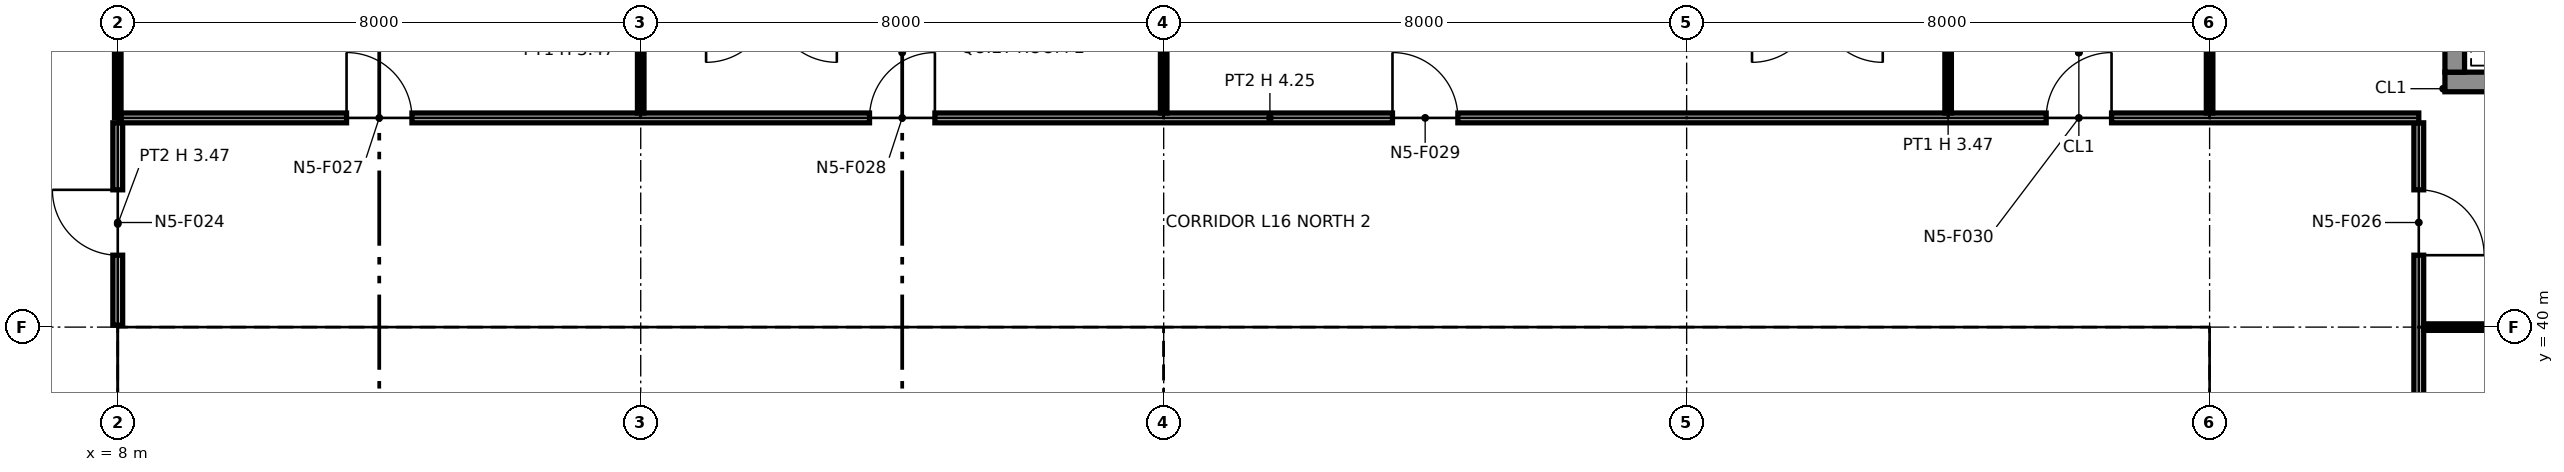
"""IFC4 building model, lengths in metres.
Left out: names, types, materials, properties, quantities, classifications, styles, units other than length and angle.
Written with IfcOpenShell. Run it as: python <this file> out.ifc"""

import sys

from ifc_helpers import new_model, si_unit, direction, frame, frame_2d, origin, origin_2d, place, context, subcontext, project, spatial, polyline, rectangle, i_section, outline, extrude, element, fill, save


model = new_model("IFC4")
c1 = context("Model", 3, precision=1e-05, world=origin(), true_north=direction((0.0, 1.0)))
c2 = subcontext(c1, "Body", "Model", "MODEL_VIEW")
j1 = project(units=[si_unit("LENGTHUNIT", "METRE"), si_unit("PLANEANGLEUNIT", "RADIAN")], contexts=[c1])
p1 = place(None, origin())
s1 = spatial("IfcSite", under=j1, at=p1, CompositionType="ELEMENT")
p2 = place(p1, origin())
s2 = spatial("IfcBuilding", under=s1, at=p2, CompositionType="ELEMENT")
p3 = place(p2, frame((0.0, 0.0, 87.6)))
s3 = spatial("IfcBuildingStorey", under=s2, at=p3, CompositionType="ELEMENT", Elevation=87.6)
for number, where, z_axis, x_axis in (
    (1, (8.0, 40.0, 0.0), (0.0, 0.0, 1.0), (1.0, 0.0, 0.0)),
    (2, (16.0, 40.0, 0.0), (0.0, 0.0, 1.0), (1.0, 0.0, 0.0)),
):
    element("IfcColumn", number, at=place(p3, frame(where, z_axis=z_axis, x_axis=x_axis)), inside=s3, PredefinedType="COLUMN", context=c2, shape_type="SweptSolid", body=[
        extrude(i_section(OverallWidth=0.394, OverallDepth=0.376, WebThickness=0.017, FlangeThickness=0.028, at=origin_2d()), origin(), (0.0, 0.0, 1.0), 4.25),
    ])
p4 = place(p3, frame((24.0, 40.0, 0.0), z_axis=(0.0, 0.0, 1.0), x_axis=(1.0, 0.0, 0.0)))
e3 = element("IfcColumn", 3, at=p4, inside=s3, PredefinedType="COLUMN", context=c2, shape_type="SweptSolid", body=[
    extrude(i_section(OverallWidth=0.399, OverallDepth=0.386, WebThickness=0.021, FlangeThickness=0.033, at=origin_2d()), origin(), (0.0, 0.0, 1.0), 4.25),
])
for number, where, z_axis, x_axis in (
    (4, (32.0, 40.0, 0.0), (0.0, 0.0, 1.0), (1.0, 0.0, 0.0)),
    (5, (40.0, 40.0, 0.0), (0.0, 0.0, 1.0), (1.0, 0.0, 0.0)),
):
    element("IfcColumn", number, at=place(p3, frame(where, z_axis=z_axis, x_axis=x_axis)), inside=s3, PredefinedType="COLUMN", context=c2, shape_type="SweptSolid", body=[
        extrude(i_section(OverallWidth=0.257, OverallDepth=0.363, WebThickness=0.013, FlangeThickness=0.022, at=origin_2d()), origin(), (0.0, 0.0, 1.0), 4.25),
    ])
p5 = place(p3, frame((45.9, 43.75, 0.0), z_axis=(0.0, 0.0, 1.0), x_axis=(-1.0, 0.0, 0.0)))
e6 = element("IfcWall", 6, at=p5, inside=s3, PredefinedType="SOLIDWALL", context=c2, shape_type="SweptSolid", body=[
    extrude(rectangle(XDim=2.3, YDim=0.3, at=frame_2d((1.15, 0.0))), origin(), (0.0, 0.0, 1.0), 4.25),
])
p6 = place(p3, frame((43.75, 43.9, 0.0), z_axis=(0.0, 0.0, 1.0), x_axis=(0.0, 1.0, 0.0)))
e7 = element("IfcWall", 7, at=p6, inside=s3, PredefinedType="SOLIDWALL", context=c2, shape_type="SweptSolid", body=[
    extrude(rectangle(XDim=1.7, YDim=0.3, at=frame_2d((0.85, 0.0))), origin(), (0.0, 0.0, 1.0), 4.25),
])
p7 = place(p3, frame((8.75, 32.85, 0.0), z_axis=(0.0, 0.0, 1.0), x_axis=(0.0, 1.0, 0.0)))
e8 = element("IfcWall", 8, at=p7, inside=s3, PredefinedType="PARTITIONING", context=c2, shape_type="SweptSolid", body=[
    extrude(outline(polyline([(0.0, 0.0), (6.3, 0.0), (6.3, 4.25), (3.231, 4.25), (3.23, 3.789), (3.07, 3.789), (3.069, 4.25), (0.0, 4.25), (0.0, 0.0)])), frame((0.0, 0.1, 0.0), z_axis=(0.0, -1.0, 0.0), x_axis=(1.0, 0.0, 0.0)), (0.0, 0.0, 1.0), 0.2),
])
p8 = place(p3, frame((8.65, 39.25, 0.0), z_axis=(0.0, 0.0, 1.0), x_axis=(1.0, 0.0, 0.0)))
e9 = element("IfcWall", 9, at=p8, inside=s3, PredefinedType="PARTITIONING", context=c2, shape_type="SweptSolid", body=[
    extrude(outline(polyline([(0.0, 0.0), (14.7, 0.0), (14.7, 4.25), (7.469, 4.25), (7.469, 3.632), (7.231, 3.632), (7.23, 4.25), (0.0, 4.25), (0.0, 0.0)])), frame((0.0, 0.1, 0.0), z_axis=(0.0, -1.0, 0.0), x_axis=(1.0, 0.0, 0.0)), (0.0, 0.0, 1.0), 0.2),
])
for number, where, z_axis, x_axis in (
    (10, (11.075, 36.15, 0.0), (0.0, 0.0, 1.0), (0.0, 1.0, 0.0)),
    (11, (13.225, 36.15, 0.0), (0.0, 0.0, 1.0), (0.0, 1.0, 0.0)),
):
    element("IfcWall", number, at=place(p3, frame(where, z_axis=z_axis, x_axis=x_axis)), inside=s3, PredefinedType="PARTITIONING", context=c2, shape_type="SweptSolid", body=[
        extrude(rectangle(XDim=3.0, YDim=0.15, at=frame_2d((1.5, 0.0))), origin(), (0.0, 0.0, 1.0), 4.25),
    ])
p9 = place(p3, frame((16.0, 36.15, 0.0), z_axis=(0.0, 0.0, 1.0), x_axis=(0.0, 1.0, 0.0)))
e12 = element("IfcWall", 12, at=p9, inside=s3, PredefinedType="PARTITIONING", context=c2, shape_type="SweptSolid", body=[
    extrude(rectangle(XDim=3.0, YDim=0.6, at=frame_2d((1.5, 0.0))), origin(), (0.0, 0.0, 1.0), 3.632),
])
for number, where, z_axis, x_axis in (
    (13, (19.2, 32.85, 0.0), (0.0, 0.0, 1.0), (0.0, 1.0, 0.0)),
    (14, (23.25, 32.85, 0.0), (0.0, 0.0, 1.0), (0.0, 1.0, 0.0)),
):
    element("IfcWall", number, at=place(p3, frame(where, z_axis=z_axis, x_axis=x_axis)), inside=s3, PredefinedType="PARTITIONING", context=c2, shape_type="SweptSolid", body=[
        extrude(rectangle(XDim=6.3, YDim=0.2, at=frame_2d((3.15, 0.0))), origin(), (0.0, 0.0, 1.0), 4.25),
    ])
p10 = place(p3, frame((24.75, 32.85, 0.0), z_axis=(0.0, 0.0, 1.0), x_axis=(0.0, 1.0, 0.0)))
e15 = element("IfcWall", 15, at=p10, inside=s3, PredefinedType="PARTITIONING", context=c2, shape_type="SweptSolid", body=[
    extrude(outline(polyline([(0.0, 0.0), (6.3, 0.0), (6.3, 4.25), (3.231, 4.25), (3.23, 3.789), (3.07, 3.789), (3.069, 4.25), (0.0, 4.25), (0.0, 0.0)])), frame((0.0, 0.1, 0.0), z_axis=(0.0, -1.0, 0.0), x_axis=(1.0, 0.0, 0.0)), (0.0, 0.0, 1.0), 0.2),
])
p11 = place(p3, frame((24.65, 39.25, 0.0), z_axis=(0.0, 0.0, 1.0), x_axis=(1.0, 0.0, 0.0)))
e16 = element("IfcWall", 16, at=p11, inside=s3, PredefinedType="PARTITIONING", context=c2, shape_type="SweptSolid", body=[
    extrude(outline(polyline([(0.0, 0.0), (14.7, 0.0), (14.7, 4.25), (7.469, 4.25), (7.469, 3.632), (7.231, 3.632), (7.23, 4.25), (0.0, 4.25), (0.0, 0.0)])), frame((0.0, 0.1, 0.0), z_axis=(0.0, -1.0, 0.0), x_axis=(1.0, 0.0, 0.0)), (0.0, 0.0, 1.0), 0.2),
])
for number, where, z_axis, x_axis in (
    (17, (27.2, 36.6, 0.0), (0.0, 0.0, 1.0), (0.0, 1.0, 0.0)),
    (18, (29.5, 36.6, 0.0), (0.0, 0.0, 1.0), (0.0, 1.0, 0.0)),
):
    element("IfcWall", number, at=place(p3, frame(where, z_axis=z_axis, x_axis=x_axis)), inside=s3, PredefinedType="PARTITIONING", context=c2, shape_type="SweptSolid", body=[
        extrude(rectangle(XDim=2.55, YDim=0.2, at=frame_2d((1.275, 0.0))), origin(), (0.0, 0.0, 1.0), 4.25),
    ])
p12 = place(p3, frame((32.0, 36.6, 0.0), z_axis=(0.0, 0.0, 1.0), x_axis=(0.0, 1.0, 0.0)))
e19 = element("IfcWall", 19, at=p12, inside=s3, PredefinedType="PARTITIONING", context=c2, shape_type="SweptSolid", body=[
    extrude(rectangle(XDim=2.55, YDim=0.6, at=frame_2d((1.275, 0.0))), origin(), (0.0, 0.0, 1.0), 3.632),
])
for number, where, z_axis, x_axis in (
    (20, (35.6, 32.85, 0.0), (0.0, 0.0, 1.0), (0.0, 1.0, 0.0)),
    (21, (39.25, 32.85, 0.0), (0.0, 0.0, 1.0), (0.0, 1.0, 0.0)),
):
    element("IfcWall", number, at=place(p3, frame(where, z_axis=z_axis, x_axis=x_axis)), inside=s3, PredefinedType="PARTITIONING", context=c2, shape_type="SweptSolid", body=[
        extrude(rectangle(XDim=6.3, YDim=0.2, at=frame_2d((3.15, 0.0))), origin(), (0.0, 0.0, 1.0), 4.25),
    ])
p13 = place(p3, frame((43.2, 16.0, 0.0), z_axis=(0.0, 0.0, 1.0), x_axis=(0.0, 1.0, 0.0)))
e22 = element("IfcWall", 22, at=p13, inside=s3, PredefinedType="PARTITIONING", context=c2, shape_type="SweptSolid", body=[
    extrude(outline(polyline([(0.0, 0.0), (27.125, 0.0), (27.125, 4.25), (24.3, 4.25), (24.298, 3.47), (23.702, 3.47), (23.7, 4.25), (20.3, 4.25), (20.298, 3.47), (19.702, 3.47), (19.7, 4.25), (16.3, 4.25), (16.298, 3.47), (15.702, 3.47), (15.7, 4.25), (12.3, 4.25), (12.298, 3.47), (11.702, 3.47), (11.7, 4.25), (8.3, 4.25), (8.298, 3.47), (7.702, 3.47), (7.7, 4.25), (4.3, 4.25), (4.298, 3.47), (3.702, 3.47), (3.7, 4.25), (0.0, 4.25), (0.0, 0.0)])), frame((0.0, 0.075, 0.0), z_axis=(0.0, -1.0, 0.0), x_axis=(1.0, 0.0, 0.0)), (0.0, 0.0, 1.0), 0.15),
])
p14 = place(p13, frame((2.5, 0.0, 0.0), z_axis=(0.0, 0.0, 1.0), x_axis=(-1.0, 0.0, 0.0)))
e23 = element("IfcOpeningElement", 23, at=p14, cuts=e22, PredefinedType="OPENING", context=c2, shape_type="SweptSolid", body=[
    extrude(rectangle(XDim=1.0, YDim=2.1, at=frame_2d((0.5, 1.05))), frame((0.0, 0.085, 0.0), z_axis=(0.0, -1.0, 0.0), x_axis=(1.0, 0.0, 0.0)), (0.0, 0.0, 1.0), 0.17),
])
p15 = place(p13, frame((12.5, 0.0, 0.0), z_axis=(0.0, 0.0, 1.0), x_axis=(-1.0, 0.0, 0.0)))
e24 = element("IfcOpeningElement", 24, at=p15, cuts=e22, PredefinedType="OPENING", context=c2, shape_type="SweptSolid", body=[
    extrude(rectangle(XDim=1.0, YDim=2.1, at=frame_2d((0.5, 1.05))), frame((0.0, 0.085, 0.0), z_axis=(0.0, -1.0, 0.0), x_axis=(1.0, 0.0, 0.0)), (0.0, 0.0, 1.0), 0.17),
])
p16 = place(p13, frame((18.5, 0.0, 0.0), z_axis=(0.0, 0.0, 1.0), x_axis=(-1.0, 0.0, 0.0)))
e25 = element("IfcOpeningElement", 25, at=p16, cuts=e22, PredefinedType="OPENING", context=c2, shape_type="SweptSolid", body=[
    extrude(rectangle(XDim=1.0, YDim=2.1, at=frame_2d((0.5, 1.05))), frame((0.0, 0.085, 0.0), z_axis=(0.0, -1.0, 0.0), x_axis=(1.0, 0.0, 0.0)), (0.0, 0.0, 1.0), 0.17),
])
p17 = place(p13, frame((22.5, 0.0, 0.0), z_axis=(0.0, 0.0, 1.0), x_axis=(-1.0, 0.0, 0.0)))
e26 = element("IfcOpeningElement", 26, at=p17, cuts=e22, PredefinedType="OPENING", context=c2, shape_type="SweptSolid", body=[
    extrude(rectangle(XDim=1.0, YDim=2.1, at=frame_2d((0.5, 1.05))), frame((0.0, 0.085, 0.0), z_axis=(0.0, -1.0, 0.0), x_axis=(1.0, 0.0, 0.0)), (0.0, 0.0, 1.0), 0.17),
])
p18 = place(p13, frame((26.1, 0.0, 0.0), z_axis=(0.0, 0.0, 1.0), x_axis=(-1.0, 0.0, 0.0)))
e27 = element("IfcOpeningElement", 27, at=p18, cuts=e22, PredefinedType="OPENING", context=c2, shape_type="SweptSolid", body=[
    extrude(rectangle(XDim=1.0, YDim=2.1, at=frame_2d((0.5, 1.05))), frame((0.0, 0.085, 0.0), z_axis=(0.0, -1.0, 0.0), x_axis=(1.0, 0.0, 0.0)), (0.0, 0.0, 1.0), 0.17),
])
p19 = place(p3, frame((43.275, 40.0, 0.0), z_axis=(0.0, 0.0, 1.0), x_axis=(1.0, 0.0, 0.0)))
e28 = element("IfcWall", 28, at=p19, inside=s3, PredefinedType="PARTITIONING", context=c2, shape_type="SweptSolid", body=[
    extrude(rectangle(XDim=4.595, YDim=0.1, at=frame_2d((2.298, 0.0))), origin(), (0.0, 0.0, 1.0), 3.47),
])
p20 = place(p3, frame((8.0, 40.03, 0.0), z_axis=(0.0, 0.0, 1.0), x_axis=(0.0, 1.0, 0.0)))
e29 = element("IfcWall", 29, at=p20, inside=s3, PredefinedType="PARTITIONING", context=c2, shape_type="SweptSolid", body=[
    extrude(rectangle(XDim=3.095, YDim=0.15, at=frame_2d((1.547, 0.0))), origin(), (0.0, 0.0, 1.0), 3.47),
])
p21 = place(p20, frame((1.07, 0.0, 0.0)))
e30 = element("IfcOpeningElement", 30, at=p21, cuts=e29, PredefinedType="OPENING", context=c2, shape_type="SweptSolid", body=[
    extrude(rectangle(XDim=1.0, YDim=2.1, at=frame_2d((0.5, 1.05))), frame((0.0, 0.085, 0.0), z_axis=(0.0, -1.0, 0.0), x_axis=(1.0, 0.0, 0.0)), (0.0, 0.0, 1.0), 0.17),
])
p22 = place(p3, frame((8.05, 43.2, 0.0), z_axis=(0.0, 0.0, 1.0), x_axis=(1.0, 0.0, 0.0)))
e31 = element("IfcWall", 31, at=p22, inside=s3, PredefinedType="PARTITIONING", context=c2, shape_type="SweptSolid", body=[
    extrude(rectangle(XDim=35.15, YDim=0.15, at=frame_2d((17.575, 0.0))), origin(), (0.0, 0.0, 1.0), 4.25),
])
p23 = place(p22, frame((3.45, 0.0, 0.0)))
e32 = element("IfcOpeningElement", 32, at=p23, cuts=e31, PredefinedType="OPENING", context=c2, shape_type="SweptSolid", body=[
    extrude(rectangle(XDim=1.0, YDim=2.1, at=frame_2d((0.5, 1.05))), frame((0.0, 0.085, 0.0), z_axis=(0.0, -1.0, 0.0), x_axis=(1.0, 0.0, 0.0)), (0.0, 0.0, 1.0), 0.17),
])
p24 = place(p22, frame((11.45, 0.0, 0.0)))
e33 = element("IfcOpeningElement", 33, at=p24, cuts=e31, PredefinedType="OPENING", context=c2, shape_type="SweptSolid", body=[
    extrude(rectangle(XDim=1.0, YDim=2.1, at=frame_2d((0.5, 1.05))), frame((0.0, 0.085, 0.0), z_axis=(0.0, -1.0, 0.0), x_axis=(1.0, 0.0, 0.0)), (0.0, 0.0, 1.0), 0.17),
])
p25 = place(p22, frame((19.45, 0.0, 0.0)))
e34 = element("IfcOpeningElement", 34, at=p25, cuts=e31, PredefinedType="OPENING", context=c2, shape_type="SweptSolid", body=[
    extrude(rectangle(XDim=1.0, YDim=2.1, at=frame_2d((0.5, 1.05))), frame((0.0, 0.085, 0.0), z_axis=(0.0, -1.0, 0.0), x_axis=(1.0, 0.0, 0.0)), (0.0, 0.0, 1.0), 0.17),
])
p26 = place(p22, frame((29.45, 0.0, 0.0)))
e35 = element("IfcOpeningElement", 35, at=p26, cuts=e31, PredefinedType="OPENING", context=c2, shape_type="SweptSolid", body=[
    extrude(rectangle(XDim=1.0, YDim=2.1, at=frame_2d((0.5, 1.05))), frame((0.0, 0.085, 0.0), z_axis=(0.0, -1.0, 0.0), x_axis=(1.0, 0.0, 0.0)), (0.0, 0.0, 1.0), 0.17),
])
p27 = place(p3, frame((8.0, 43.2, 0.0), z_axis=(0.0, 0.0, 1.0), x_axis=(0.0, 1.0, 0.0)))
e36 = element("IfcWall", 36, at=p27, inside=s3, PredefinedType="PARTITIONING", context=c2, shape_type="SweptSolid", body=[
    extrude(rectangle(XDim=4.67, YDim=0.1, at=frame_2d((2.335, 0.0))), origin(), (0.0, 0.0, 1.0), 3.47),
])
for number, where, z_axis, x_axis in (
    (37, (16.0, 43.275, 0.0), (0.0, 0.0, 1.0), (0.0, 1.0, 0.0)),
    (38, (24.0, 43.275, 0.0), (0.0, 0.0, 1.0), (0.0, 1.0, 0.0)),
    (39, (36.0, 43.275, 0.0), (0.0, 0.0, 1.0), (0.0, 1.0, 0.0)),
    (40, (40.0, 43.275, 0.0), (0.0, 0.0, 1.0), (0.0, 1.0, 0.0)),
):
    element("IfcWall", number, at=place(p3, frame(where, z_axis=z_axis, x_axis=x_axis)), inside=s3, PredefinedType="PARTITIONING", context=c2, shape_type="SweptSolid", body=[
        extrude(rectangle(XDim=1.895, YDim=0.1, at=frame_2d((0.948, 0.0))), origin(), (0.0, 0.0, 1.0), 3.47),
    ])
p28 = place(p21, origin())
e41 = element("IfcDoor", 41, at=p28, inside=s3, OperationType="SINGLE_SWING_RIGHT", PredefinedType="DOOR", context=c2, shape_type="SweptSolid", body=[
    extrude(rectangle(XDim=1.0, YDim=2.1, at=frame_2d((0.5, 1.05))), frame((0.0, 0.025, 0.0), z_axis=(0.0, -1.0, 0.0), x_axis=(1.0, 0.0, 0.0)), (0.0, 0.0, 1.0), 0.05),
])
fill(e30, e41)
p29 = place(p18, origin())
e42 = element("IfcDoor", 42, at=p29, inside=s3, OperationType="SINGLE_SWING_RIGHT", PredefinedType="DOOR", context=c2, shape_type="SweptSolid", body=[
    extrude(rectangle(XDim=1.0, YDim=2.1, at=frame_2d((0.5, 1.05))), frame((0.0, 0.025, 0.0), z_axis=(0.0, -1.0, 0.0), x_axis=(1.0, 0.0, 0.0)), (0.0, 0.0, 1.0), 0.05),
])
fill(e27, e42)
p30 = place(p23, origin())
e43 = element("IfcDoor", 43, at=p30, inside=s3, OperationType="SINGLE_SWING_LEFT", PredefinedType="DOOR", context=c2, shape_type="SweptSolid", body=[
    extrude(rectangle(XDim=1.0, YDim=2.1, at=frame_2d((0.5, 1.05))), frame((0.0, 0.025, 0.0), z_axis=(0.0, -1.0, 0.0), x_axis=(1.0, 0.0, 0.0)), (0.0, 0.0, 1.0), 0.05),
])
fill(e32, e43)
p31 = place(p24, origin())
e44 = element("IfcDoor", 44, at=p31, inside=s3, OperationType="SINGLE_SWING_RIGHT", PredefinedType="DOOR", context=c2, shape_type="SweptSolid", body=[
    extrude(rectangle(XDim=1.0, YDim=2.1, at=frame_2d((0.5, 1.05))), frame((0.0, 0.025, 0.0), z_axis=(0.0, -1.0, 0.0), x_axis=(1.0, 0.0, 0.0)), (0.0, 0.0, 1.0), 0.05),
])
fill(e33, e44)
p32 = place(p25, origin())
e45 = element("IfcDoor", 45, at=p32, inside=s3, OperationType="SINGLE_SWING_LEFT", PredefinedType="DOOR", context=c2, shape_type="SweptSolid", body=[
    extrude(rectangle(XDim=1.0, YDim=2.1, at=frame_2d((0.5, 1.05))), frame((0.0, 0.025, 0.0), z_axis=(0.0, -1.0, 0.0), x_axis=(1.0, 0.0, 0.0)), (0.0, 0.0, 1.0), 0.05),
])
fill(e34, e45)
p33 = place(p26, origin())
e46 = element("IfcDoor", 46, at=p33, inside=s3, OperationType="SINGLE_SWING_RIGHT", PredefinedType="DOOR", context=c2, shape_type="SweptSolid", body=[
    extrude(rectangle(XDim=1.0, YDim=2.1, at=frame_2d((0.5, 1.05))), frame((0.0, 0.025, 0.0), z_axis=(0.0, -1.0, 0.0), x_axis=(1.0, 0.0, 0.0)), (0.0, 0.0, 1.0), 0.05),
])
fill(e35, e46)
save(model, sys.argv[1])
